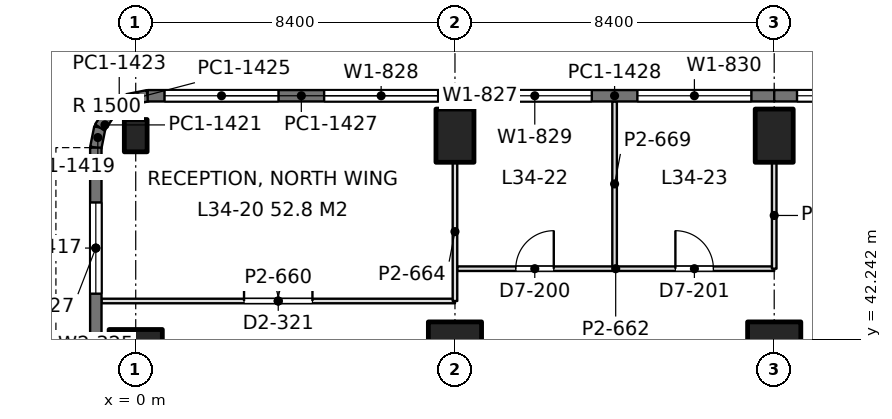
"""IFC4 building model, lengths in metres.
Left out: names, types, materials, properties, quantities, classifications, styles, units other than length and angle.
Written with IfcOpenShell. Run it as: python <this file> out.ifc"""

import sys

from ifc_helpers import new_model, si_unit, direction, frame, frame_2d, origin, origin_2d, place, context, subcontext, project, spatial, rectangle, extrude, element, fill, save


model = new_model("IFC4")
c1 = context("Model", 3, precision=1e-05, world=origin(), true_north=direction((0.0, 1.0)))
c2 = subcontext(c1, "Body", "Model", "MODEL_VIEW")
j1 = project(units=[si_unit("LENGTHUNIT", "METRE"), si_unit("PLANEANGLEUNIT", "RADIAN")], contexts=[c1])
p1 = place(None, origin())
s1 = spatial("IfcSite", under=j1, at=p1, CompositionType="ELEMENT")
p2 = place(p1, origin())
s2 = spatial("IfcBuilding", under=s1, at=p2, CompositionType="ELEMENT")
p3 = place(p2, frame((0.0, 0.0, 151.2)))
s3 = spatial("IfcBuildingStorey", under=s2, at=p3, CompositionType="ELEMENT", Elevation=151.2)
p4 = place(p3, frame((0.0, 42.0, 0.0), z_axis=(0.0, 0.0, 1.0), x_axis=(0.0, 1.0, 0.0)))
e1 = element("IfcColumn", 1, at=p4, inside=s3, PredefinedType="COLUMN", context=c2, shape_type="SweptSolid", body=[
    extrude(rectangle(XDim=1.0, YDim=1.4, at=origin_2d()), origin(), (0.0, 0.0, 1.0), 4.2),
])
p5 = place(p3, frame((0.0, 47.6, 0.0), z_axis=(0.0, 0.0, 1.0), x_axis=(1.0, 0.0, 0.0)))
e2 = element("IfcColumn", 2, at=p5, inside=s3, PredefinedType="COLUMN", context=c2, shape_type="SweptSolid", body=[
    extrude(rectangle(XDim=0.6, YDim=0.85, at=origin_2d()), origin(), (0.0, 0.0, 1.0), 4.2),
])
p6 = place(p3, frame((8.4, 42.0, 0.0), z_axis=(0.0, 0.0, 1.0), x_axis=(1.0, 0.0, 0.0)))
e3 = element("IfcColumn", 3, at=p6, inside=s3, PredefinedType="COLUMN", context=c2, shape_type="SweptSolid", body=[
    extrude(rectangle(XDim=1.4, YDim=1.4, at=origin_2d()), origin(), (0.0, 0.0, 1.0), 4.2),
])
p7 = place(p3, frame((8.4, 47.6, 0.0), z_axis=(0.0, 0.0, 1.0), x_axis=(1.0, 0.0, 0.0)))
e4 = element("IfcColumn", 4, at=p7, inside=s3, PredefinedType="COLUMN", context=c2, shape_type="SweptSolid", body=[
    extrude(rectangle(XDim=1.0, YDim=1.4, at=origin_2d()), origin(), (0.0, 0.0, 1.0), 4.2),
])
p8 = place(p3, frame((16.8, 42.0, 0.0), z_axis=(0.0, 0.0, 1.0), x_axis=(1.0, 0.0, 0.0)))
e5 = element("IfcColumn", 5, at=p8, inside=s3, PredefinedType="COLUMN", context=c2, shape_type="SweptSolid", body=[
    extrude(rectangle(XDim=1.4, YDim=1.4, at=origin_2d()), origin(), (0.0, 0.0, 1.0), 4.2),
])
p9 = place(p3, frame((16.8, 47.6, 0.0), z_axis=(0.0, 0.0, 1.0), x_axis=(1.0, 0.0, 0.0)))
e6 = element("IfcColumn", 6, at=p9, inside=s3, PredefinedType="COLUMN", context=c2, shape_type="SweptSolid", body=[
    extrude(rectangle(XDim=1.0, YDim=1.4, at=origin_2d()), origin(), (0.0, 0.0, 1.0), 4.2),
])
p10 = place(p3, frame((-1.05, 42.0, 0.0), z_axis=(0.0, 0.0, 1.0), x_axis=(0.0, 1.0, 0.0)))
e7 = element("IfcWall", 7, at=p10, inside=s3, PredefinedType="SOLIDWALL", context=c2, shape_type="SweptSolid", body=[
    extrude(rectangle(XDim=5.285, YDim=0.3, at=frame_2d((2.643, 0.0))), origin(), (0.0, 0.0, 1.0), 4.05),
])
p11 = place(p10, frame((1.443, 0.0, 0.9)))
e8 = element("IfcOpeningElement", 8, at=p11, cuts=e7, PredefinedType="OPENING", context=c2, shape_type="SweptSolid", body=[
    extrude(rectangle(XDim=2.4, YDim=1.9, at=frame_2d((1.2, 0.95))), frame((0.0, 0.16, 0.0), z_axis=(0.0, -1.0, 0.0), x_axis=(1.0, 0.0, 0.0)), (0.0, 0.0, 1.0), 0.32),
])
p12 = place(p3, frame((-1.05, 47.285, 0.0), z_axis=(0.0, 0.0, 1.0), x_axis=(0.195073962632, 0.980788534345, 0.0)))
e9 = element("IfcWall", 9, at=p12, inside=s3, PredefinedType="SOLIDWALL", context=c2, shape_type="SweptSolid", body=[
    extrude(rectangle(XDim=0.541, YDim=0.3, at=frame_2d((0.271, 0.0))), origin(), (0.0, 0.0, 1.0), 4.05),
])
p13 = place(p3, frame((-0.945, 47.815, 0.0), z_axis=(0.0, 0.0, 1.0), x_axis=(0.55534295404, 0.831621430339, 0.0)))
e10 = element("IfcWall", 10, at=p13, inside=s3, PredefinedType="SOLIDWALL", context=c2, shape_type="SweptSolid", body=[
    extrude(rectangle(XDim=0.526, YDim=0.3, at=frame_2d((0.263, 0.0))), origin(), (0.0, 0.0, 1.0), 4.05),
])
p14 = place(p3, frame((-0.653, 48.253, 0.0), z_axis=(0.0, 0.0, 1.0), x_axis=(0.831692711774, 0.555236195849, 0.0)))
e11 = element("IfcWall", 11, at=p14, inside=s3, PredefinedType="SOLIDWALL", context=c2, shape_type="SweptSolid", body=[
    extrude(rectangle(XDim=0.525, YDim=0.3, at=frame_2d((0.263, 0.0))), origin(), (0.0, 0.0, 1.0), 4.05),
])
p15 = place(p3, frame((-0.216, 48.544, 0.0), z_axis=(0.0, 0.0, 1.0), x_axis=(0.980788534345, 0.195073962632, 0.0)))
e12 = element("IfcWall", 12, at=p15, inside=s3, PredefinedType="SOLIDWALL", context=c2, shape_type="SweptSolid", body=[
    extrude(rectangle(XDim=0.541, YDim=0.3, at=frame_2d((0.271, 0.0))), origin(), (0.0, 0.0, 1.0), 4.05),
])
p16 = place(p3, frame((0.315, 48.65, 0.0), z_axis=(0.0, 0.0, 1.0), x_axis=(1.0, 0.0, 0.0)))
e13 = element("IfcWall", 13, at=p16, inside=s3, PredefinedType="SOLIDWALL", context=c2, shape_type="SweptSolid", body=[
    extrude(rectangle(XDim=8.085, YDim=0.3, at=frame_2d((4.042, 0.0))), origin(), (0.0, 0.0, 1.0), 4.05),
])
p17 = place(p16, frame((0.443, 0.0, 0.9)))
e14 = element("IfcOpeningElement", 14, at=p17, cuts=e13, PredefinedType="OPENING", context=c2, shape_type="SweptSolid", body=[
    extrude(rectangle(XDim=3.0, YDim=1.9, at=frame_2d((1.5, 0.95))), frame((0.0, 0.16, 0.0), z_axis=(0.0, -1.0, 0.0), x_axis=(1.0, 0.0, 0.0)), (0.0, 0.0, 1.0), 0.32),
])
p18 = place(p16, frame((4.643, 0.0, 0.9)))
e15 = element("IfcOpeningElement", 15, at=p18, cuts=e13, PredefinedType="OPENING", context=c2, shape_type="SweptSolid", body=[
    extrude(rectangle(XDim=3.0, YDim=1.9, at=frame_2d((1.5, 0.95))), frame((0.0, 0.16, 0.0), z_axis=(0.0, -1.0, 0.0), x_axis=(1.0, 0.0, 0.0)), (0.0, 0.0, 1.0), 0.32),
])
p19 = place(p3, frame((8.4, 48.65, 0.0), z_axis=(0.0, 0.0, 1.0), x_axis=(1.0, 0.0, 0.0)))
e16 = element("IfcWall", 16, at=p19, inside=s3, PredefinedType="SOLIDWALL", context=c2, shape_type="SweptSolid", body=[
    extrude(rectangle(XDim=8.4, YDim=0.3, at=frame_2d((4.2, 0.0))), origin(), (0.0, 0.0, 1.0), 4.05),
])
p20 = place(p19, frame((0.6, 0.0, 0.9)))
e17 = element("IfcOpeningElement", 17, at=p20, cuts=e16, PredefinedType="OPENING", context=c2, shape_type="SweptSolid", body=[
    extrude(rectangle(XDim=3.0, YDim=1.9, at=frame_2d((1.5, 0.95))), frame((0.0, 0.16, 0.0), z_axis=(0.0, -1.0, 0.0), x_axis=(1.0, 0.0, 0.0)), (0.0, 0.0, 1.0), 0.32),
])
p21 = place(p19, frame((4.8, 0.0, 0.9)))
e18 = element("IfcOpeningElement", 18, at=p21, cuts=e16, PredefinedType="OPENING", context=c2, shape_type="SweptSolid", body=[
    extrude(rectangle(XDim=3.0, YDim=1.9, at=frame_2d((1.5, 0.95))), frame((0.0, 0.16, 0.0), z_axis=(0.0, -1.0, 0.0), x_axis=(1.0, 0.0, 0.0)), (0.0, 0.0, 1.0), 0.32),
])
p22 = place(p3, frame((16.8, 48.65, 0.0), z_axis=(0.0, 0.0, 1.0), x_axis=(1.0, 0.0, 0.0)))
e19 = element("IfcWall", 19, at=p22, inside=s3, PredefinedType="SOLIDWALL", context=c2, shape_type="SweptSolid", body=[
    extrude(rectangle(XDim=8.4, YDim=0.3, at=frame_2d((4.2, 0.0))), origin(), (0.0, 0.0, 1.0), 4.05),
])
p23 = place(p22, frame((0.6, 0.0, 0.9)))
e20 = element("IfcOpeningElement", 20, at=p23, cuts=e19, PredefinedType="OPENING", context=c2, shape_type="SweptSolid", body=[
    extrude(rectangle(XDim=3.0, YDim=1.9, at=frame_2d((1.5, 0.95))), frame((0.0, 0.16, 0.0), z_axis=(0.0, -1.0, 0.0), x_axis=(1.0, 0.0, 0.0)), (0.0, 0.0, 1.0), 0.32),
])
p24 = place(p22, frame((4.8, 0.0, 0.9)))
e21 = element("IfcOpeningElement", 21, at=p24, cuts=e19, PredefinedType="OPENING", context=c2, shape_type="SweptSolid", body=[
    extrude(rectangle(XDim=3.0, YDim=1.9, at=frame_2d((1.5, 0.95))), frame((0.0, 0.16, 0.0), z_axis=(0.0, -1.0, 0.0), x_axis=(1.0, 0.0, 0.0)), (0.0, 0.0, 1.0), 0.32),
])
p25 = place(p3, frame((-0.902, 43.25, 0.0), z_axis=(0.0, 0.0, 1.0), x_axis=(1.0, 0.0, 0.0)))
e22 = element("IfcWall", 22, at=p25, inside=s3, PredefinedType="PARTITIONING", context=c2, shape_type="SweptSolid", body=[
    extrude(rectangle(XDim=9.302, YDim=0.12, at=frame_2d((4.651, 0.0))), origin(), (0.0, 0.0, 1.0), 3.55),
])
p26 = place(p25, frame((3.752, 0.0, 0.0)))
e23 = element("IfcOpeningElement", 23, at=p26, cuts=e22, PredefinedType="OPENING", context=c2, shape_type="SweptSolid", body=[
    extrude(rectangle(XDim=1.8, YDim=2.2, at=frame_2d((0.9, 1.1))), frame((0.0, 0.07, 0.0), z_axis=(0.0, -1.0, 0.0), x_axis=(1.0, 0.0, 0.0)), (0.0, 0.0, 1.0), 0.14),
])
p27 = place(p3, frame((8.458, 44.1, 0.0), z_axis=(0.0, 0.0, 1.0), x_axis=(1.0, 0.0, 0.0)))
e24 = element("IfcWall", 24, at=p27, inside=s3, PredefinedType="PARTITIONING", context=c2, shape_type="SweptSolid", body=[
    extrude(rectangle(XDim=8.342, YDim=0.12, at=frame_2d((4.171, 0.0))), origin(), (0.0, 0.0, 1.0), 3.55),
])
p28 = place(p27, frame((1.542, 0.0, 0.0)))
e25 = element("IfcOpeningElement", 25, at=p28, cuts=e24, PredefinedType="OPENING", context=c2, shape_type="SweptSolid", body=[
    extrude(rectangle(XDim=1.0, YDim=2.4, at=frame_2d((0.5, 1.2))), frame((0.0, 0.07, 0.0), z_axis=(0.0, -1.0, 0.0), x_axis=(1.0, 0.0, 0.0)), (0.0, 0.0, 1.0), 0.14),
])
p29 = place(p27, frame((5.742, 0.0, 0.0)))
e26 = element("IfcOpeningElement", 26, at=p29, cuts=e24, PredefinedType="OPENING", context=c2, shape_type="SweptSolid", body=[
    extrude(rectangle(XDim=1.0, YDim=2.4, at=frame_2d((0.5, 1.2))), frame((0.0, 0.07, 0.0), z_axis=(0.0, -1.0, 0.0), x_axis=(1.0, 0.0, 0.0)), (0.0, 0.0, 1.0), 0.14),
])
p30 = place(p3, frame((8.4, 43.25, 0.0), z_axis=(0.0, 0.0, 1.0), x_axis=(0.0, 1.0, 0.0)))
e27 = element("IfcWall", 27, at=p30, inside=s3, PredefinedType="PARTITIONING", context=c2, shape_type="SweptSolid", body=[
    extrude(rectangle(XDim=3.651, YDim=0.12, at=frame_2d((1.825, 0.0))), origin(), (0.0, 0.0, 1.0), 3.55),
])
p31 = place(p3, frame((12.6, 44.158, 0.0), z_axis=(0.0, 0.0, 1.0), x_axis=(0.0, 1.0, 0.0)))
e28 = element("IfcWall", 28, at=p31, inside=s3, PredefinedType="PARTITIONING", context=c2, shape_type="SweptSolid", body=[
    extrude(rectangle(XDim=4.344, YDim=0.12, at=frame_2d((2.172, 0.0))), origin(), (0.0, 0.0, 1.0), 3.56),
])
p32 = place(p3, frame((16.8, 44.1, 0.0), z_axis=(0.0, 0.0, 1.0), x_axis=(0.0, 1.0, 0.0)))
e29 = element("IfcWall", 29, at=p32, inside=s3, PredefinedType="PARTITIONING", context=c2, shape_type="SweptSolid", body=[
    extrude(rectangle(XDim=2.801, YDim=0.12, at=frame_2d((1.4, 0.0))), origin(), (0.0, 0.0, 1.0), 3.55),
])
p33 = place(p11, origin())
e30 = element("IfcWindow", 30, at=p33, inside=s3, PartitioningType="SINGLE_PANEL", PredefinedType="WINDOW", context=c2, shape_type="SweptSolid", body=[
    extrude(rectangle(XDim=2.4, YDim=1.9, at=frame_2d((1.2, 0.95))), frame((0.0, 0.03, 0.0), z_axis=(0.0, -1.0, 0.0), x_axis=(1.0, 0.0, 0.0)), (0.0, 0.0, 1.0), 0.06),
])
fill(e8, e30)
p34 = place(p17, origin())
e31 = element("IfcWindow", 31, at=p34, inside=s3, PartitioningType="SINGLE_PANEL", PredefinedType="WINDOW", context=c2, shape_type="SweptSolid", body=[
    extrude(rectangle(XDim=3.0, YDim=1.9, at=frame_2d((1.5, 0.95))), frame((0.0, 0.03, 0.0), z_axis=(0.0, -1.0, 0.0), x_axis=(1.0, 0.0, 0.0)), (0.0, 0.0, 1.0), 0.06),
])
fill(e14, e31)
p35 = place(p18, origin())
e32 = element("IfcWindow", 32, at=p35, inside=s3, PartitioningType="SINGLE_PANEL", PredefinedType="WINDOW", context=c2, shape_type="SweptSolid", body=[
    extrude(rectangle(XDim=3.0, YDim=1.9, at=frame_2d((1.5, 0.95))), frame((0.0, 0.03, 0.0), z_axis=(0.0, -1.0, 0.0), x_axis=(1.0, 0.0, 0.0)), (0.0, 0.0, 1.0), 0.06),
])
fill(e15, e32)
p36 = place(p20, origin())
e33 = element("IfcWindow", 33, at=p36, inside=s3, PartitioningType="SINGLE_PANEL", PredefinedType="WINDOW", context=c2, shape_type="SweptSolid", body=[
    extrude(rectangle(XDim=3.0, YDim=1.9, at=frame_2d((1.5, 0.95))), frame((0.0, 0.03, 0.0), z_axis=(0.0, -1.0, 0.0), x_axis=(1.0, 0.0, 0.0)), (0.0, 0.0, 1.0), 0.06),
])
fill(e17, e33)
p37 = place(p21, origin())
e34 = element("IfcWindow", 34, at=p37, inside=s3, PartitioningType="SINGLE_PANEL", PredefinedType="WINDOW", context=c2, shape_type="SweptSolid", body=[
    extrude(rectangle(XDim=3.0, YDim=1.9, at=frame_2d((1.5, 0.95))), frame((0.0, 0.03, 0.0), z_axis=(0.0, -1.0, 0.0), x_axis=(1.0, 0.0, 0.0)), (0.0, 0.0, 1.0), 0.06),
])
fill(e18, e34)
p38 = place(p23, origin())
e35 = element("IfcWindow", 35, at=p38, inside=s3, PartitioningType="SINGLE_PANEL", PredefinedType="WINDOW", context=c2, shape_type="SweptSolid", body=[
    extrude(rectangle(XDim=3.0, YDim=1.9, at=frame_2d((1.5, 0.95))), frame((0.0, 0.03, 0.0), z_axis=(0.0, -1.0, 0.0), x_axis=(1.0, 0.0, 0.0)), (0.0, 0.0, 1.0), 0.06),
])
fill(e20, e35)
p39 = place(p26, origin())
e36 = element("IfcDoor", 36, at=p39, inside=s3, OperationType="DOUBLE_DOOR_SINGLE_SWING", PredefinedType="DOOR", context=c2, shape_type="SweptSolid", body=[
    extrude(rectangle(XDim=1.8, YDim=2.2, at=frame_2d((0.9, 1.1))), frame((0.0, 0.025, 0.0), z_axis=(0.0, -1.0, 0.0), x_axis=(1.0, 0.0, 0.0)), (0.0, 0.0, 1.0), 0.05),
])
fill(e23, e36)
p40 = place(p28, origin())
e37 = element("IfcDoor", 37, at=p40, inside=s3, OperationType="SINGLE_SWING_RIGHT", PredefinedType="DOOR", context=c2, shape_type="SweptSolid", body=[
    extrude(rectangle(XDim=1.0, YDim=2.4, at=frame_2d((0.5, 1.2))), frame((0.0, 0.025, 0.0), z_axis=(0.0, -1.0, 0.0), x_axis=(1.0, 0.0, 0.0)), (0.0, 0.0, 1.0), 0.05),
])
fill(e25, e37)
p41 = place(p29, origin())
e38 = element("IfcDoor", 38, at=p41, inside=s3, OperationType="SINGLE_SWING_LEFT", PredefinedType="DOOR", context=c2, shape_type="SweptSolid", body=[
    extrude(rectangle(XDim=1.0, YDim=2.4, at=frame_2d((0.5, 1.2))), frame((0.0, 0.025, 0.0), z_axis=(0.0, -1.0, 0.0), x_axis=(1.0, 0.0, 0.0)), (0.0, 0.0, 1.0), 0.05),
])
fill(e26, e38)
save(model, sys.argv[1])
